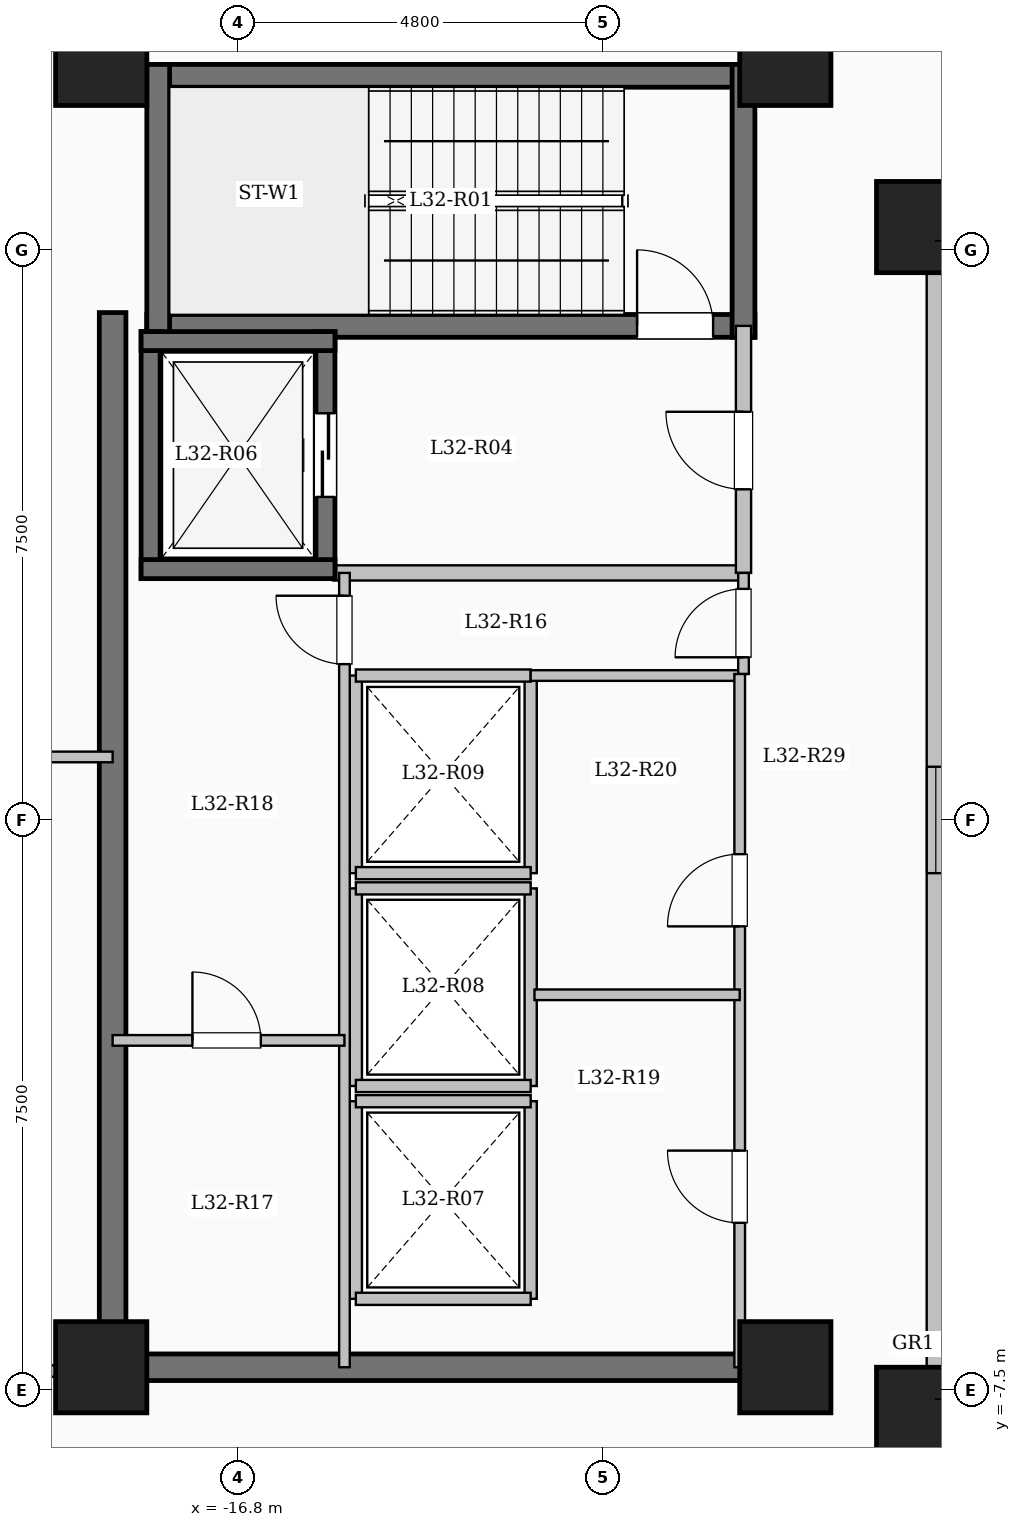
"""IFC4 building model, lengths in metres.
Left out: names, types, materials, properties, quantities, classifications, styles, units other than length and angle.
Written with IfcOpenShell. Run it as: python <this file> out.ifc"""

import sys

from ifc_helpers import new_model, si_unit, direction, frame, frame_2d, origin, origin_2d, place, context, subcontext, project, spatial, rectangle, extrude, element, fill, save


model = new_model("IFC4")
c1 = context("Model", 3, precision=1e-05, world=origin(), true_north=direction((0.0, 1.0)))
c2 = subcontext(c1, "Body", "Model", "MODEL_VIEW")
j1 = project(units=[si_unit("LENGTHUNIT", "METRE"), si_unit("PLANEANGLEUNIT", "RADIAN")], contexts=[c1])
p1 = place(None, origin())
s1 = spatial("IfcSite", under=j1, at=p1, CompositionType="ELEMENT")
p2 = place(p1, origin())
s2 = spatial("IfcBuilding", under=s1, at=p2, CompositionType="ELEMENT")
p3 = place(p2, frame((0.0, 0.0, 118.5)))
s3 = spatial("IfcBuildingStorey", under=s2, at=p3, CompositionType="ELEMENT", Elevation=118.5)
for number, where, z_axis, x_axis in (
    (1, (-7.8, -7.8, 0.0), (0.0, 0.0, 1.0), (1.0, 0.0, 0.0)),
    (2, (-7.8, 7.8, 0.0), (0.0, 0.0, 1.0), (1.0, 0.0, 0.0)),
    (3, (-9.6, -7.2, 0.0), (0.0, 0.0, 1.0), (1.0, 0.0, 0.0)),
    (4, (-9.6, 10.0, 0.0), (0.0, 0.0, 1.0), (1.0, 0.0, 0.0)),
    (5, (-18.6, -7.2, 0.0), (0.0, 0.0, 1.0), (1.0, 0.0, 0.0)),
    (6, (-18.6, 10.0, 0.0), (0.0, 0.0, 1.0), (1.0, 0.0, 0.0)),
):
    element("IfcColumn", number, at=place(p3, frame(where, z_axis=z_axis, x_axis=x_axis)), inside=s3, PredefinedType="COLUMN", context=c2, shape_type="SweptSolid", body=[
        extrude(rectangle(XDim=1.2, YDim=1.2, at=origin_2d()), origin(), (0.0, 0.0, 1.0), 4.5),
    ])
p4 = place(p3, frame((-7.62, 7.62, 0.0), z_axis=(0.0, 0.0, 1.0), x_axis=(0.0, -1.0, 0.0)))
e7 = element("IfcWall", 7, at=p4, inside=s3, PredefinedType="SOLIDWALL", context=c2, shape_type="SweptSolid", body=[
    extrude(rectangle(XDim=15.24, YDim=0.24, at=frame_2d((7.62, 0.0))), origin(), (0.0, 0.0, 1.0), 4.2),
])
p5 = place(p4, frame((6.92, 0.0, 0.95)))
e8 = element("IfcOpeningElement", 8, at=p5, cuts=e7, PredefinedType="OPENING", context=c2, shape_type="SweptSolid", body=[
    extrude(rectangle(XDim=1.4, YDim=1.5, at=frame_2d((0.7, 0.75))), frame((0.0, 0.13, 0.0), z_axis=(0.0, -1.0, 0.0), x_axis=(1.0, 0.0, 0.0)), (0.0, 0.0, 1.0), 0.26),
])
p6 = place(p3, frame((-18.0, 9.79, 0.0), z_axis=(0.0, 0.0, 1.0), x_axis=(1.0, 0.0, 0.0)))
e9 = element("IfcWall", 9, at=p6, inside=s3, PredefinedType="SHEAR", context=c2, shape_type="SweptSolid", body=[
    extrude(rectangle(XDim=8.0, YDim=0.3, at=frame_2d((4.0, 0.0))), origin(), (0.0, 0.0, 1.0), 4.5),
])
p7 = place(p3, frame((-18.0, 6.5, 0.0), z_axis=(0.0, 0.0, 1.0), x_axis=(1.0, 0.0, 0.0)))
e10 = element("IfcWall", 10, at=p7, inside=s3, PredefinedType="SHEAR", context=c2, shape_type="SweptSolid", body=[
    extrude(rectangle(XDim=8.0, YDim=0.3, at=frame_2d((4.0, 0.0))), origin(), (0.0, 0.0, 1.0), 4.5),
])
p8 = place(p7, frame((6.45, 0.0, 0.0)))
e11 = element("IfcOpeningElement", 11, at=p8, cuts=e10, PredefinedType="OPENING", context=c2, shape_type="SweptSolid", body=[
    extrude(rectangle(XDim=1.0, YDim=2.15, at=frame_2d((0.5, 1.075))), frame((0.0, 0.16, 0.0), z_axis=(0.0, -1.0, 0.0), x_axis=(1.0, 0.0, 0.0)), (0.0, 0.0, 1.0), 0.32),
])
for number, where, z_axis, x_axis in (
    (12, (-17.85, 6.35, 0.0), (0.0, 0.0, 1.0), (0.0, 1.0, 0.0)),
    (13, (-10.15, 6.35, 0.0), (0.0, 0.0, 1.0), (0.0, 1.0, 0.0)),
):
    element("IfcWall", number, at=place(p3, frame(where, z_axis=z_axis, x_axis=x_axis)), inside=s3, PredefinedType="SHEAR", context=c2, shape_type="SweptSolid", body=[
        extrude(rectangle(XDim=3.59, YDim=0.3, at=frame_2d((1.795, 0.0))), origin(), (0.0, 0.0, 1.0), 4.5),
    ])
p9 = place(p3, frame((-15.55, 3.25, 0.0), z_axis=(0.0, 0.0, 1.0), x_axis=(1.0, 0.0, 0.0)))
e14 = element("IfcWall", 14, at=p9, inside=s3, PredefinedType="SOLIDWALL", context=c2, shape_type="SweptSolid", body=[
    extrude(rectangle(XDim=5.4, YDim=0.2, at=frame_2d((2.7, 0.0))), origin(), (0.0, 0.0, 1.0), 4.2),
])
p10 = place(p3, frame((-10.15, 3.25, 0.0), z_axis=(0.0, 0.0, 1.0), x_axis=(0.0, 1.0, 0.0)))
e15 = element("IfcWall", 15, at=p10, inside=s3, PredefinedType="SOLIDWALL", context=c2, shape_type="SweptSolid", body=[
    extrude(rectangle(XDim=3.25, YDim=0.2, at=frame_2d((1.625, 0.0))), origin(), (0.0, 0.0, 1.0), 4.2),
])
p11 = place(p10, frame((1.1, 0.0, 0.0)))
e16 = element("IfcOpeningElement", 16, at=p11, cuts=e15, PredefinedType="OPENING", context=c2, shape_type="SweptSolid", body=[
    extrude(rectangle(XDim=1.02, YDim=2.15, at=frame_2d((0.51, 1.075))), frame((0.0, 0.11, 0.0), z_axis=(0.0, -1.0, 0.0), x_axis=(1.0, 0.0, 0.0)), (0.0, 0.0, 1.0), 0.22),
])
p12 = place(p3, frame((-17.95, 3.175, 0.0), z_axis=(0.0, 0.0, 1.0), x_axis=(0.0, 1.0, 0.0)))
e17 = element("IfcWall", 17, at=p12, inside=s3, PredefinedType="SHEAR", context=c2, shape_type="SweptSolid", body=[
    extrude(rectangle(XDim=3.25, YDim=0.25, at=frame_2d((1.625, 0.0))), origin(), (0.0, 0.0, 1.0), 4.5),
])
p13 = place(p3, frame((-15.65, 3.175, 0.0), z_axis=(0.0, 0.0, 1.0), x_axis=(0.0, 1.0, 0.0)))
e18 = element("IfcWall", 18, at=p13, inside=s3, PredefinedType="SHEAR", context=c2, shape_type="SweptSolid", body=[
    extrude(rectangle(XDim=3.25, YDim=0.25, at=frame_2d((1.625, 0.0))), origin(), (0.0, 0.0, 1.0), 4.5),
])
p14 = place(p13, frame((1.075, 0.0, 0.0)))
e19 = element("IfcOpeningElement", 19, at=p14, cuts=e18, PredefinedType="OPENING", context=c2, shape_type="SweptSolid", body=[
    extrude(rectangle(XDim=1.1, YDim=2.15, at=frame_2d((0.55, 1.075))), frame((0.0, 0.135, 0.0), z_axis=(0.0, -1.0, 0.0), x_axis=(1.0, 0.0, 0.0)), (0.0, 0.0, 1.0), 0.27),
])
for number, where, z_axis, x_axis in (
    (20, (-18.075, 3.3, 0.0), (0.0, 0.0, 1.0), (1.0, 0.0, 0.0)),
    (21, (-18.075, 6.3, 0.0), (0.0, 0.0, 1.0), (1.0, 0.0, 0.0)),
):
    element("IfcWall", number, at=place(p3, frame(where, z_axis=z_axis, x_axis=x_axis)), inside=s3, PredefinedType="SHEAR", context=c2, shape_type="SweptSolid", body=[
        extrude(rectangle(XDim=2.55, YDim=0.25, at=frame_2d((1.275, 0.0))), origin(), (0.0, 0.0, 1.0), 4.5),
    ])
for number, where, z_axis, x_axis in (
    (22, (-15.25, -6.3, 0.0), (0.0, 0.0, 1.0), (0.0, 1.0, 0.0)),
    (23, (-12.95, -6.3, 0.0), (0.0, 0.0, 1.0), (0.0, 1.0, 0.0)),
):
    element("IfcWall", number, at=place(p3, frame(where, z_axis=z_axis, x_axis=x_axis)), inside=s3, PredefinedType="SOLIDWALL", context=c2, shape_type="SweptSolid", body=[
        extrude(rectangle(XDim=2.6, YDim=0.16, at=frame_2d((1.3, 0.0))), origin(), (0.0, 0.0, 1.0), 4.2),
    ])
for number, where, z_axis, x_axis in (
    (24, (-15.25, -6.3, 0.0), (0.0, 0.0, 1.0), (1.0, 0.0, 0.0)),
    (25, (-15.25, -3.7, 0.0), (0.0, 0.0, 1.0), (1.0, 0.0, 0.0)),
):
    element("IfcWall", number, at=place(p3, frame(where, z_axis=z_axis, x_axis=x_axis)), inside=s3, PredefinedType="SOLIDWALL", context=c2, shape_type="SweptSolid", body=[
        extrude(rectangle(XDim=2.3, YDim=0.16, at=frame_2d((1.15, 0.0))), origin(), (0.0, 0.0, 1.0), 4.2),
    ])
for number, where, z_axis, x_axis in (
    (26, (-15.25, -3.5, 0.0), (0.0, 0.0, 1.0), (0.0, 1.0, 0.0)),
    (27, (-12.95, -3.5, 0.0), (0.0, 0.0, 1.0), (0.0, 1.0, 0.0)),
):
    element("IfcWall", number, at=place(p3, frame(where, z_axis=z_axis, x_axis=x_axis)), inside=s3, PredefinedType="SOLIDWALL", context=c2, shape_type="SweptSolid", body=[
        extrude(rectangle(XDim=2.6, YDim=0.16, at=frame_2d((1.3, 0.0))), origin(), (0.0, 0.0, 1.0), 4.2),
    ])
for number, where, z_axis, x_axis in (
    (28, (-15.25, -3.5, 0.0), (0.0, 0.0, 1.0), (1.0, 0.0, 0.0)),
    (29, (-15.25, -0.9, 0.0), (0.0, 0.0, 1.0), (1.0, 0.0, 0.0)),
):
    element("IfcWall", number, at=place(p3, frame(where, z_axis=z_axis, x_axis=x_axis)), inside=s3, PredefinedType="SOLIDWALL", context=c2, shape_type="SweptSolid", body=[
        extrude(rectangle(XDim=2.3, YDim=0.16, at=frame_2d((1.15, 0.0))), origin(), (0.0, 0.0, 1.0), 4.2),
    ])
for number, where, z_axis, x_axis in (
    (30, (-15.25, -0.7, 0.0), (0.0, 0.0, 1.0), (0.0, 1.0, 0.0)),
    (31, (-12.95, -0.7, 0.0), (0.0, 0.0, 1.0), (0.0, 1.0, 0.0)),
):
    element("IfcWall", number, at=place(p3, frame(where, z_axis=z_axis, x_axis=x_axis)), inside=s3, PredefinedType="SOLIDWALL", context=c2, shape_type="SweptSolid", body=[
        extrude(rectangle(XDim=2.6, YDim=0.16, at=frame_2d((1.3, 0.0))), origin(), (0.0, 0.0, 1.0), 4.2),
    ])
for number, where, z_axis, x_axis in (
    (32, (-15.25, -0.7, 0.0), (0.0, 0.0, 1.0), (1.0, 0.0, 0.0)),
    (33, (-15.25, 1.9, 0.0), (0.0, 0.0, 1.0), (1.0, 0.0, 0.0)),
):
    element("IfcWall", number, at=place(p3, frame(where, z_axis=z_axis, x_axis=x_axis)), inside=s3, PredefinedType="SOLIDWALL", context=c2, shape_type="SweptSolid", body=[
        extrude(rectangle(XDim=2.3, YDim=0.16, at=frame_2d((1.15, 0.0))), origin(), (0.0, 0.0, 1.0), 4.2),
    ])
p15 = place(p3, frame((-18.45, -7.375, 0.0), z_axis=(0.0, 0.0, 1.0), x_axis=(0.0, 1.0, 0.0)))
e34 = element("IfcWall", 34, at=p15, inside=s3, PredefinedType="SHEAR", context=c2, shape_type="SweptSolid", body=[
    extrude(rectangle(XDim=14.05, YDim=0.35, at=frame_2d((7.025, 0.0))), origin(), (0.0, 0.0, 1.0), 4.5),
])
p16 = place(p3, frame((-18.625, -7.2, 0.0), z_axis=(0.0, 0.0, 1.0), x_axis=(1.0, 0.0, 0.0)))
e35 = element("IfcWall", 35, at=p16, inside=s3, PredefinedType="SHEAR", context=c2, shape_type="SweptSolid", body=[
    extrude(rectangle(XDim=8.55, YDim=0.35, at=frame_2d((4.275, 0.0))), origin(), (0.0, 0.0, 1.0), 4.5),
])
p17 = place(p3, frame((-12.95, 1.9, 0.0), z_axis=(0.0, 0.0, 1.0), x_axis=(1.0, 0.0, 0.0)))
e36 = element("IfcWall", 36, at=p17, inside=s3, PredefinedType="PARTITIONING", context=c2, shape_type="SweptSolid", body=[
    extrude(rectangle(XDim=2.8, YDim=0.14, at=frame_2d((1.4, 0.0))), origin(), (0.0, 0.0, 1.0), 4.2),
])
p18 = place(p3, frame((-10.15, 1.92, 0.0), z_axis=(0.0, 0.0, 1.0), x_axis=(0.0, 1.0, 0.0)))
e37 = element("IfcWall", 37, at=p18, inside=s3, PredefinedType="PARTITIONING", context=c2, shape_type="SweptSolid", body=[
    extrude(rectangle(XDim=1.33, YDim=0.14, at=frame_2d((0.665, 0.0))), origin(), (0.0, 0.0, 1.0), 4.2),
])
p19 = place(p18, frame((0.22, 0.0, 0.0)))
e38 = element("IfcOpeningElement", 38, at=p19, cuts=e37, PredefinedType="OPENING", context=c2, shape_type="SweptSolid", body=[
    extrude(rectangle(XDim=0.9, YDim=2.08, at=frame_2d((0.45, 1.04))), frame((0.0, 0.08, 0.0), z_axis=(0.0, -1.0, 0.0), x_axis=(1.0, 0.0, 0.0)), (0.0, 0.0, 1.0), 0.16),
])
p20 = place(p3, frame((-15.4, -7.2, 0.0), z_axis=(0.0, 0.0, 1.0), x_axis=(0.0, 1.0, 0.0)))
e39 = element("IfcWall", 39, at=p20, inside=s3, PredefinedType="PARTITIONING", context=c2, shape_type="SweptSolid", body=[
    extrude(rectangle(XDim=10.45, YDim=0.14, at=frame_2d((5.225, 0.0))), origin(), (0.0, 0.0, 1.0), 4.2),
])
p21 = place(p20, frame((9.25, 0.0, 0.0)))
e40 = element("IfcOpeningElement", 40, at=p21, cuts=e39, PredefinedType="OPENING", context=c2, shape_type="SweptSolid", body=[
    extrude(rectangle(XDim=0.9, YDim=2.08, at=frame_2d((0.45, 1.04))), frame((0.0, 0.08, 0.0), z_axis=(0.0, -1.0, 0.0), x_axis=(1.0, 0.0, 0.0)), (0.0, 0.0, 1.0), 0.16),
])
p22 = place(p3, frame((-18.45, -2.9, 0.0), z_axis=(0.0, 0.0, 1.0), x_axis=(1.0, 0.0, 0.0)))
e41 = element("IfcWall", 41, at=p22, inside=s3, PredefinedType="PARTITIONING", context=c2, shape_type="SweptSolid", body=[
    extrude(rectangle(XDim=3.05, YDim=0.14, at=frame_2d((1.525, 0.0))), origin(), (0.0, 0.0, 1.0), 4.2),
])
p23 = place(p22, frame((1.05, 0.0, 0.0)))
e42 = element("IfcOpeningElement", 42, at=p23, cuts=e41, PredefinedType="OPENING", context=c2, shape_type="SweptSolid", body=[
    extrude(rectangle(XDim=0.9, YDim=2.08, at=frame_2d((0.45, 1.04))), frame((0.0, 0.08, 0.0), z_axis=(0.0, -1.0, 0.0), x_axis=(1.0, 0.0, 0.0)), (0.0, 0.0, 1.0), 0.16),
])
p24 = place(p3, frame((-10.2, -7.2, 0.0), z_axis=(0.0, 0.0, 1.0), x_axis=(0.0, 1.0, 0.0)))
e43 = element("IfcWall", 43, at=p24, inside=s3, PredefinedType="PARTITIONING", context=c2, shape_type="SweptSolid", body=[
    extrude(rectangle(XDim=9.12, YDim=0.14, at=frame_2d((4.56, 0.0))), origin(), (0.0, 0.0, 1.0), 4.2),
])
p25 = place(p24, frame((1.9, 0.0, 0.0)))
e44 = element("IfcOpeningElement", 44, at=p25, cuts=e43, PredefinedType="OPENING", context=c2, shape_type="SweptSolid", body=[
    extrude(rectangle(XDim=0.95, YDim=2.12, at=frame_2d((0.475, 1.06))), frame((0.0, 0.08, 0.0), z_axis=(0.0, -1.0, 0.0), x_axis=(1.0, 0.0, 0.0)), (0.0, 0.0, 1.0), 0.16),
])
p26 = place(p24, frame((5.8, 0.0, 0.0)))
e45 = element("IfcOpeningElement", 45, at=p26, cuts=e43, PredefinedType="OPENING", context=c2, shape_type="SweptSolid", body=[
    extrude(rectangle(XDim=0.95, YDim=2.12, at=frame_2d((0.475, 1.06))), frame((0.0, 0.08, 0.0), z_axis=(0.0, -1.0, 0.0), x_axis=(1.0, 0.0, 0.0)), (0.0, 0.0, 1.0), 0.16),
])
p27 = place(p3, frame((-12.9, -2.3, 0.0), z_axis=(0.0, 0.0, 1.0), x_axis=(1.0, 0.0, 0.0)))
e46 = element("IfcWall", 46, at=p27, inside=s3, PredefinedType="PARTITIONING", context=c2, shape_type="SweptSolid", body=[
    extrude(rectangle(XDim=2.7, YDim=0.14, at=frame_2d((1.35, 0.0))), origin(), (0.0, 0.0, 1.0), 4.2),
])
p28 = place(p3, frame((-26.88, -7.25, 0.0), z_axis=(0.0, 0.0, 1.0), x_axis=(1.0, 0.0, 0.0)))
e47 = element("IfcWall", 47, at=p28, inside=s3, PredefinedType="PARTITIONING", context=c2, shape_type="SweptSolid", body=[
    extrude(rectangle(XDim=8.43, YDim=0.15, at=frame_2d((4.215, 0.0))), origin(), (0.0, 0.0, 1.0), 4.2),
])
p29 = place(p28, frame((5.23, 0.0, 0.0)))
e48 = element("IfcOpeningElement", 48, at=p29, cuts=e47, PredefinedType="OPENING", context=c2, shape_type="SweptSolid", body=[
    extrude(rectangle(XDim=1.08, YDim=2.15, at=frame_2d((0.54, 1.075))), frame((0.0, 0.085, 0.0), z_axis=(0.0, -1.0, 0.0), x_axis=(1.0, 0.0, 0.0)), (0.0, 0.0, 1.0), 0.17),
])
p30 = place(p3, frame((-26.88, 0.829, 0.0), z_axis=(0.0, 0.0, 1.0), x_axis=(1.0, 0.0, 0.0)))
e49 = element("IfcWall", 49, at=p30, inside=s3, PredefinedType="PARTITIONING", context=c2, shape_type="SweptSolid", body=[
    extrude(rectangle(XDim=8.43, YDim=0.14, at=frame_2d((4.215, 0.0))), origin(), (0.0, 0.0, 1.0), 4.2),
])
p31 = place(p30, frame((6.28, 0.0, 0.0)))
e50 = element("IfcOpeningElement", 50, at=p31, cuts=e49, PredefinedType="OPENING", context=c2, shape_type="SweptSolid", body=[
    extrude(rectangle(XDim=1.08, YDim=2.15, at=frame_2d((0.54, 1.075))), frame((0.0, 0.08, 0.0), z_axis=(0.0, -1.0, 0.0), x_axis=(1.0, 0.0, 0.0)), (0.0, 0.0, 1.0), 0.16),
])
p32 = place(p5, origin())
e51 = element("IfcWindow", 51, at=p32, inside=s3, PartitioningType="SINGLE_PANEL", PredefinedType="WINDOW", context=c2, shape_type="SweptSolid", body=[
    extrude(rectangle(XDim=1.4, YDim=1.5, at=frame_2d((0.7, 0.75))), frame((0.0, 0.03, 0.0), z_axis=(0.0, -1.0, 0.0), x_axis=(1.0, 0.0, 0.0)), (0.0, 0.0, 1.0), 0.06),
])
fill(e8, e51)
p33 = place(p8, origin())
e52 = element("IfcDoor", 52, at=p33, inside=s3, OperationType="SINGLE_SWING_LEFT", PredefinedType="DOOR", context=c2, shape_type="SweptSolid", body=[
    extrude(rectangle(XDim=1.0, YDim=2.15, at=frame_2d((0.5, 1.075))), frame((0.0, 0.025, 0.0), z_axis=(0.0, -1.0, 0.0), x_axis=(1.0, 0.0, 0.0)), (0.0, 0.0, 1.0), 0.05),
])
fill(e11, e52)
p34 = place(p11, origin())
e53 = element("IfcDoor", 53, at=p34, inside=s3, OperationType="SINGLE_SWING_RIGHT", PredefinedType="DOOR", context=c2, shape_type="SweptSolid", body=[
    extrude(rectangle(XDim=1.02, YDim=2.15, at=frame_2d((0.51, 1.075))), frame((0.0, 0.025, 0.0), z_axis=(0.0, -1.0, 0.0), x_axis=(1.0, 0.0, 0.0)), (0.0, 0.0, 1.0), 0.05),
])
fill(e16, e53)
p35 = place(p14, origin())
e54 = element("IfcDoor", 54, at=p35, inside=s3, OperationType="SLIDING_TO_LEFT", PredefinedType="DOOR", context=c2, shape_type="SweptSolid", body=[
    extrude(rectangle(XDim=1.1, YDim=2.15, at=frame_2d((0.55, 1.075))), frame((0.0, 0.025, 0.0), z_axis=(0.0, -1.0, 0.0), x_axis=(1.0, 0.0, 0.0)), (0.0, 0.0, 1.0), 0.05),
])
fill(e19, e54)
p36 = place(p19, origin())
e55 = element("IfcDoor", 55, at=p36, inside=s3, OperationType="SINGLE_SWING_LEFT", PredefinedType="DOOR", context=c2, shape_type="SweptSolid", body=[
    extrude(rectangle(XDim=0.9, YDim=2.08, at=frame_2d((0.45, 1.04))), frame((0.0, 0.025, 0.0), z_axis=(0.0, -1.0, 0.0), x_axis=(1.0, 0.0, 0.0)), (0.0, 0.0, 1.0), 0.05),
])
fill(e38, e55)
p37 = place(p21, origin())
e56 = element("IfcDoor", 56, at=p37, inside=s3, OperationType="SINGLE_SWING_RIGHT", PredefinedType="DOOR", context=c2, shape_type="SweptSolid", body=[
    extrude(rectangle(XDim=0.9, YDim=2.08, at=frame_2d((0.45, 1.04))), frame((0.0, 0.025, 0.0), z_axis=(0.0, -1.0, 0.0), x_axis=(1.0, 0.0, 0.0)), (0.0, 0.0, 1.0), 0.05),
])
fill(e40, e56)
p38 = place(p23, origin())
e57 = element("IfcDoor", 57, at=p38, inside=s3, OperationType="SINGLE_SWING_LEFT", PredefinedType="DOOR", context=c2, shape_type="SweptSolid", body=[
    extrude(rectangle(XDim=0.9, YDim=2.08, at=frame_2d((0.45, 1.04))), frame((0.0, 0.025, 0.0), z_axis=(0.0, -1.0, 0.0), x_axis=(1.0, 0.0, 0.0)), (0.0, 0.0, 1.0), 0.05),
])
fill(e42, e57)
p39 = place(p25, origin())
e58 = element("IfcDoor", 58, at=p39, inside=s3, OperationType="SINGLE_SWING_RIGHT", PredefinedType="DOOR", context=c2, shape_type="SweptSolid", body=[
    extrude(rectangle(XDim=0.95, YDim=2.12, at=frame_2d((0.475, 1.06))), frame((0.0, 0.025, 0.0), z_axis=(0.0, -1.0, 0.0), x_axis=(1.0, 0.0, 0.0)), (0.0, 0.0, 1.0), 0.05),
])
fill(e44, e58)
p40 = place(p26, origin())
e59 = element("IfcDoor", 59, at=p40, inside=s3, OperationType="SINGLE_SWING_LEFT", PredefinedType="DOOR", context=c2, shape_type="SweptSolid", body=[
    extrude(rectangle(XDim=0.95, YDim=2.12, at=frame_2d((0.475, 1.06))), frame((0.0, 0.025, 0.0), z_axis=(0.0, -1.0, 0.0), x_axis=(1.0, 0.0, 0.0)), (0.0, 0.0, 1.0), 0.05),
])
fill(e45, e59)
save(model, sys.argv[1])
